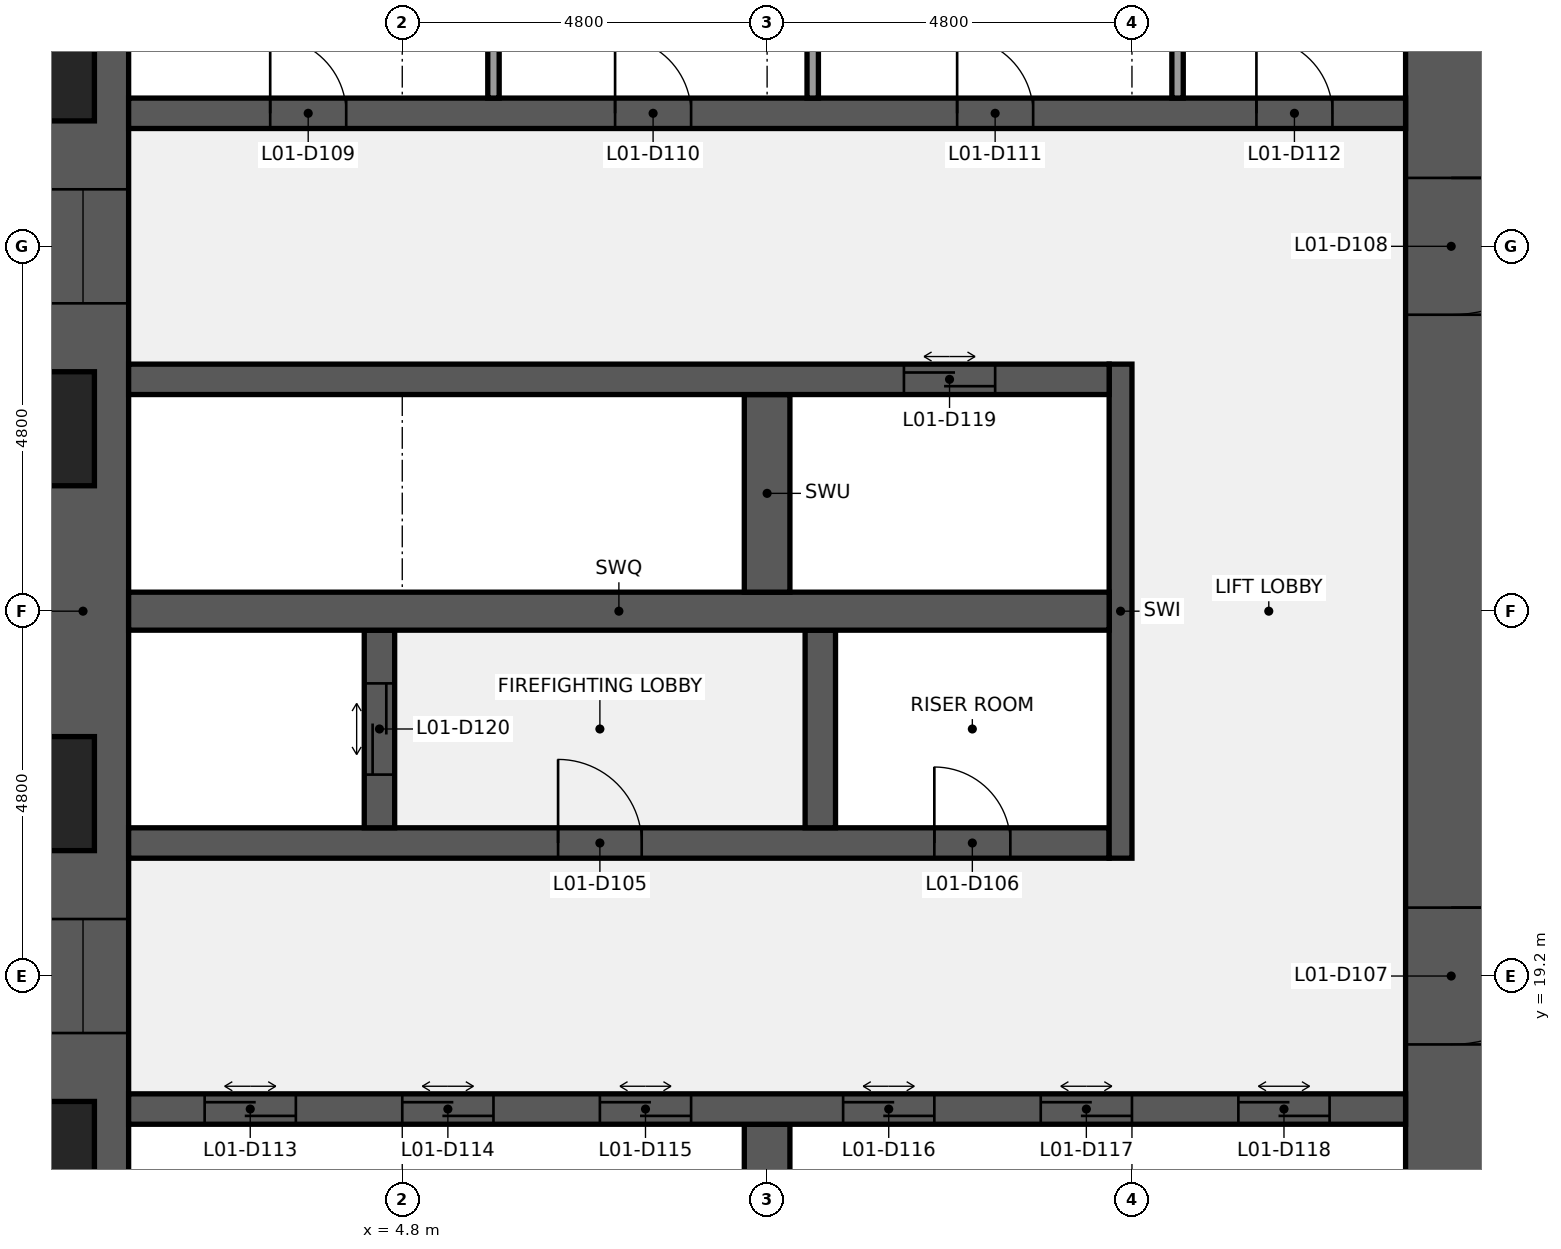
"""IFC4 building model, lengths in metres.
Left out: names, types, materials, properties, quantities, classifications, styles, units other than length and angle.
Written with IfcOpenShell. Run it as: python <this file> out.ifc"""

import sys

from ifc_helpers import new_model, si_unit, direction, frame, frame_2d, origin, place, context, subcontext, project, spatial, rectangle, extrude, element, fill, save


model = new_model("IFC4")
c1 = context("Model", 3, precision=1e-05, world=origin(), true_north=direction((0.0, 1.0)))
c2 = subcontext(c1, "Body", "Model", "MODEL_VIEW")
j1 = project(units=[si_unit("LENGTHUNIT", "METRE"), si_unit("PLANEANGLEUNIT", "RADIAN")], contexts=[c1])
p1 = place(None, origin())
s1 = spatial("IfcSite", under=j1, at=p1, CompositionType="ELEMENT")
p2 = place(p1, origin())
s2 = spatial("IfcBuilding", under=s1, at=p2, CompositionType="ELEMENT")
p3 = place(p2, frame((0.0, 0.0, 12.6)))
s3 = spatial("IfcBuildingStorey", under=s2, at=p3, CompositionType="ELEMENT", Elevation=12.6)
p4 = place(p3, frame((0.6, 9.6, 0.0), z_axis=(0.0, 0.0, 1.0), x_axis=(0.0, 1.0, 0.0)))
e1 = element("IfcWall", 1, at=p4, inside=s3, PredefinedType="SHEAR", context=c2, shape_type="SweptSolid", body=[
    extrude(rectangle(XDim=28.8, YDim=1.2, at=frame_2d((14.4, 0.0))), origin(), (0.0, 0.0, 1.0), 4.24),
])
p5 = place(p4, frame((8.85, 0.0, 0.9)))
e2 = element("IfcOpeningElement", 2, at=p5, cuts=e1, PredefinedType="OPENING", context=c2, shape_type="SweptSolid", body=[
    extrude(rectangle(XDim=1.5, YDim=1.5, at=frame_2d((0.75, 0.75))), frame((0.0, 0.61, 0.0), z_axis=(0.0, -1.0, 0.0), x_axis=(1.0, 0.0, 0.0)), (0.0, 0.0, 1.0), 1.22),
])
p6 = place(p4, frame((18.45, 0.0, 0.9)))
e3 = element("IfcOpeningElement", 3, at=p6, cuts=e1, PredefinedType="OPENING", context=c2, shape_type="SweptSolid", body=[
    extrude(rectangle(XDim=1.5, YDim=1.5, at=frame_2d((0.75, 0.75))), frame((0.0, 0.61, 0.0), z_axis=(0.0, -1.0, 0.0), x_axis=(1.0, 0.0, 0.0)), (0.0, 0.0, 1.0), 1.22),
])
p7 = place(p3, frame((18.6, 38.4, 0.0), z_axis=(0.0, 0.0, 1.0), x_axis=(0.0, -1.0, 0.0)))
e4 = element("IfcWall", 4, at=p7, inside=s3, PredefinedType="SHEAR", context=c2, shape_type="SweptSolid", body=[
    extrude(rectangle(XDim=28.8, YDim=1.2, at=frame_2d((14.4, 0.0))), origin(), (0.0, 0.0, 1.0), 4.24),
])
p8 = place(p7, frame((18.3, 0.0, 0.0)))
e5 = element("IfcOpeningElement", 5, at=p8, cuts=e4, PredefinedType="OPENING", context=c2, shape_type="SweptSolid", body=[
    extrude(rectangle(XDim=1.8, YDim=2.1, at=frame_2d((0.9, 1.05))), frame((0.0, 0.61, 0.0), z_axis=(0.0, -1.0, 0.0), x_axis=(1.0, 0.0, 0.0)), (0.0, 0.0, 1.0), 1.22),
])
p9 = place(p7, frame((8.7, 0.0, 0.0)))
e6 = element("IfcOpeningElement", 6, at=p9, cuts=e4, PredefinedType="OPENING", context=c2, shape_type="SweptSolid", body=[
    extrude(rectangle(XDim=1.8, YDim=2.1, at=frame_2d((0.9, 1.05))), frame((0.0, 0.61, 0.0), z_axis=(0.0, -1.0, 0.0), x_axis=(1.0, 0.0, 0.0)), (0.0, 0.0, 1.0), 1.22),
])
p10 = place(p3, frame((9.6, 14.65, 0.0), z_axis=(0.0, 0.0, 1.0), x_axis=(0.0, 1.0, 0.0)))
e7 = element("IfcWall", 7, at=p10, inside=s3, PredefinedType="SHEAR", context=c2, shape_type="SweptSolid", body=[
    extrude(rectangle(XDim=2.6, YDim=0.6, at=frame_2d((1.3, 0.0))), origin(), (0.0, 0.0, 1.0), 4.24),
])
p11 = place(p3, frame((1.2, 17.45, 0.0), z_axis=(0.0, 0.0, 1.0), x_axis=(1.0, 0.0, 0.0)))
e8 = element("IfcWall", 8, at=p11, inside=s3, PredefinedType="SHEAR", context=c2, shape_type="SweptSolid", body=[
    extrude(rectangle(XDim=16.8, YDim=0.4, at=frame_2d((8.4, 0.0))), origin(), (0.0, 0.0, 1.0), 4.24),
])
p12 = place(p11, frame((1.0, 0.0, 0.0)))
e9 = element("IfcOpeningElement", 9, at=p12, cuts=e8, PredefinedType="OPENING", context=c2, shape_type="SweptSolid", body=[
    extrude(rectangle(XDim=1.2, YDim=2.1, at=frame_2d((0.6, 1.05))), frame((0.0, 0.21, 0.0), z_axis=(0.0, -1.0, 0.0), x_axis=(1.0, 0.0, 0.0)), (0.0, 0.0, 1.0), 0.42),
])
p13 = place(p11, frame((3.6, 0.0, 0.0)))
e10 = element("IfcOpeningElement", 10, at=p13, cuts=e8, PredefinedType="OPENING", context=c2, shape_type="SweptSolid", body=[
    extrude(rectangle(XDim=1.2, YDim=2.1, at=frame_2d((0.6, 1.05))), frame((0.0, 0.21, 0.0), z_axis=(0.0, -1.0, 0.0), x_axis=(1.0, 0.0, 0.0)), (0.0, 0.0, 1.0), 0.42),
])
p14 = place(p11, frame((6.2, 0.0, 0.0)))
e11 = element("IfcOpeningElement", 11, at=p14, cuts=e8, PredefinedType="OPENING", context=c2, shape_type="SweptSolid", body=[
    extrude(rectangle(XDim=1.2, YDim=2.1, at=frame_2d((0.6, 1.05))), frame((0.0, 0.21, 0.0), z_axis=(0.0, -1.0, 0.0), x_axis=(1.0, 0.0, 0.0)), (0.0, 0.0, 1.0), 0.42),
])
p15 = place(p11, frame((9.4, 0.0, 0.0)))
e12 = element("IfcOpeningElement", 12, at=p15, cuts=e8, PredefinedType="OPENING", context=c2, shape_type="SweptSolid", body=[
    extrude(rectangle(XDim=1.2, YDim=2.1, at=frame_2d((0.6, 1.05))), frame((0.0, 0.21, 0.0), z_axis=(0.0, -1.0, 0.0), x_axis=(1.0, 0.0, 0.0)), (0.0, 0.0, 1.0), 0.42),
])
p16 = place(p11, frame((12.0, 0.0, 0.0)))
e13 = element("IfcOpeningElement", 13, at=p16, cuts=e8, PredefinedType="OPENING", context=c2, shape_type="SweptSolid", body=[
    extrude(rectangle(XDim=1.2, YDim=2.1, at=frame_2d((0.6, 1.05))), frame((0.0, 0.21, 0.0), z_axis=(0.0, -1.0, 0.0), x_axis=(1.0, 0.0, 0.0)), (0.0, 0.0, 1.0), 0.42),
])
p17 = place(p11, frame((14.6, 0.0, 0.0)))
e14 = element("IfcOpeningElement", 14, at=p17, cuts=e8, PredefinedType="OPENING", context=c2, shape_type="SweptSolid", body=[
    extrude(rectangle(XDim=1.2, YDim=2.1, at=frame_2d((0.6, 1.05))), frame((0.0, 0.21, 0.0), z_axis=(0.0, -1.0, 0.0), x_axis=(1.0, 0.0, 0.0)), (0.0, 0.0, 1.0), 0.42),
])
p18 = place(p3, frame((1.2, 20.95, 0.0), z_axis=(0.0, 0.0, 1.0), x_axis=(1.0, 0.0, 0.0)))
e15 = element("IfcWall", 15, at=p18, inside=s3, PredefinedType="SHEAR", context=c2, shape_type="SweptSolid", body=[
    extrude(rectangle(XDim=12.9, YDim=0.4, at=frame_2d((6.45, 0.0))), origin(), (0.0, 0.0, 1.0), 4.24),
])
p19 = place(p18, frame((5.65, 0.0, 0.0)))
e16 = element("IfcOpeningElement", 16, at=p19, cuts=e15, PredefinedType="OPENING", context=c2, shape_type="SweptSolid", body=[
    extrude(rectangle(XDim=1.1, YDim=2.1, at=frame_2d((0.55, 1.05))), frame((0.0, 0.21, 0.0), z_axis=(0.0, -1.0, 0.0), x_axis=(1.0, 0.0, 0.0)), (0.0, 0.0, 1.0), 0.42),
])
p20 = place(p18, frame((10.6, 0.0, 0.0)))
e17 = element("IfcOpeningElement", 17, at=p20, cuts=e15, PredefinedType="OPENING", context=c2, shape_type="SweptSolid", body=[
    extrude(rectangle(XDim=1.0, YDim=2.1, at=frame_2d((0.5, 1.05))), frame((0.0, 0.21, 0.0), z_axis=(0.0, -1.0, 0.0), x_axis=(1.0, 0.0, 0.0)), (0.0, 0.0, 1.0), 0.42),
])
p21 = place(p3, frame((14.25, 20.75, 0.0), z_axis=(0.0, 0.0, 1.0), x_axis=(0.0, 1.0, 0.0)))
e18 = element("IfcWall", 18, at=p21, inside=s3, PredefinedType="SHEAR", context=c2, shape_type="SweptSolid", body=[
    extrude(rectangle(XDim=6.5, YDim=0.3, at=frame_2d((3.25, 0.0))), origin(), (0.0, 0.0, 1.0), 4.24),
])
p22 = place(p3, frame((4.5, 21.15, 0.0), z_axis=(0.0, 0.0, 1.0), x_axis=(0.0, 1.0, 0.0)))
e19 = element("IfcWall", 19, at=p22, inside=s3, PredefinedType="SHEAR", context=c2, shape_type="SweptSolid", body=[
    extrude(rectangle(XDim=2.6, YDim=0.4, at=frame_2d((1.3, 0.0))), origin(), (0.0, 0.0, 1.0), 4.24),
])
p23 = place(p22, frame((0.7, 0.0, 0.0)))
e20 = element("IfcOpeningElement", 20, at=p23, cuts=e19, PredefinedType="OPENING", context=c2, shape_type="SweptSolid", body=[
    extrude(rectangle(XDim=1.2, YDim=2.1, at=frame_2d((0.6, 1.05))), frame((0.0, 0.21, 0.0), z_axis=(0.0, -1.0, 0.0), x_axis=(1.0, 0.0, 0.0)), (0.0, 0.0, 1.0), 0.42),
])
p24 = place(p3, frame((10.3, 21.15, 0.0), z_axis=(0.0, 0.0, 1.0), x_axis=(0.0, 1.0, 0.0)))
e21 = element("IfcWall", 21, at=p24, inside=s3, PredefinedType="SHEAR", context=c2, shape_type="SweptSolid", body=[
    extrude(rectangle(XDim=2.6, YDim=0.4, at=frame_2d((1.3, 0.0))), origin(), (0.0, 0.0, 1.0), 4.24),
])
p25 = place(p3, frame((1.2, 24.0, 0.0), z_axis=(0.0, 0.0, 1.0), x_axis=(1.0, 0.0, 0.0)))
e22 = element("IfcWall", 22, at=p25, inside=s3, PredefinedType="SHEAR", context=c2, shape_type="SweptSolid", body=[
    extrude(rectangle(XDim=12.9, YDim=0.5, at=frame_2d((6.45, 0.0))), origin(), (0.0, 0.0, 1.0), 4.24),
])
p26 = place(p3, frame((9.6, 24.25, 0.0), z_axis=(0.0, 0.0, 1.0), x_axis=(0.0, 1.0, 0.0)))
e23 = element("IfcWall", 23, at=p26, inside=s3, PredefinedType="SHEAR", context=c2, shape_type="SweptSolid", body=[
    extrude(rectangle(XDim=2.6, YDim=0.6, at=frame_2d((1.3, 0.0))), origin(), (0.0, 0.0, 1.0), 4.24),
])
p27 = place(p3, frame((1.2, 27.05, 0.0), z_axis=(0.0, 0.0, 1.0), x_axis=(1.0, 0.0, 0.0)))
e24 = element("IfcWall", 24, at=p27, inside=s3, PredefinedType="SHEAR", context=c2, shape_type="SweptSolid", body=[
    extrude(rectangle(XDim=12.9, YDim=0.4, at=frame_2d((6.45, 0.0))), origin(), (0.0, 0.0, 1.0), 4.24),
])
p28 = place(p27, frame((10.2, 0.0, 0.0)))
e25 = element("IfcOpeningElement", 25, at=p28, cuts=e24, PredefinedType="OPENING", context=c2, shape_type="SweptSolid", body=[
    extrude(rectangle(XDim=1.2, YDim=2.1, at=frame_2d((0.6, 1.05))), frame((0.0, 0.21, 0.0), z_axis=(0.0, -1.0, 0.0), x_axis=(1.0, 0.0, 0.0)), (0.0, 0.0, 1.0), 0.42),
])
p29 = place(p3, frame((1.2, 30.55, 0.0), z_axis=(0.0, 0.0, 1.0), x_axis=(1.0, 0.0, 0.0)))
e26 = element("IfcWall", 26, at=p29, inside=s3, PredefinedType="SHEAR", context=c2, shape_type="SweptSolid", body=[
    extrude(rectangle(XDim=16.8, YDim=0.4, at=frame_2d((8.4, 0.0))), origin(), (0.0, 0.0, 1.0), 4.24),
])
p30 = place(p29, frame((1.863, 0.0, 0.0)))
e27 = element("IfcOpeningElement", 27, at=p30, cuts=e26, PredefinedType="OPENING", context=c2, shape_type="SweptSolid", body=[
    extrude(rectangle(XDim=1.0, YDim=2.1, at=frame_2d((0.5, 1.05))), frame((0.0, 0.21, 0.0), z_axis=(0.0, -1.0, 0.0), x_axis=(1.0, 0.0, 0.0)), (0.0, 0.0, 1.0), 0.42),
])
p31 = place(p29, frame((6.4, 0.0, 0.0)))
e28 = element("IfcOpeningElement", 28, at=p31, cuts=e26, PredefinedType="OPENING", context=c2, shape_type="SweptSolid", body=[
    extrude(rectangle(XDim=1.0, YDim=2.1, at=frame_2d((0.5, 1.05))), frame((0.0, 0.21, 0.0), z_axis=(0.0, -1.0, 0.0), x_axis=(1.0, 0.0, 0.0)), (0.0, 0.0, 1.0), 0.42),
])
p32 = place(p29, frame((10.9, 0.0, 0.0)))
e29 = element("IfcOpeningElement", 29, at=p32, cuts=e26, PredefinedType="OPENING", context=c2, shape_type="SweptSolid", body=[
    extrude(rectangle(XDim=1.0, YDim=2.1, at=frame_2d((0.5, 1.05))), frame((0.0, 0.21, 0.0), z_axis=(0.0, -1.0, 0.0), x_axis=(1.0, 0.0, 0.0)), (0.0, 0.0, 1.0), 0.42),
])
p33 = place(p29, frame((14.837, 0.0, 0.0)))
e30 = element("IfcOpeningElement", 30, at=p33, cuts=e26, PredefinedType="OPENING", context=c2, shape_type="SweptSolid", body=[
    extrude(rectangle(XDim=1.0, YDim=2.1, at=frame_2d((0.5, 1.05))), frame((0.0, 0.21, 0.0), z_axis=(0.0, -1.0, 0.0), x_axis=(1.0, 0.0, 0.0)), (0.0, 0.0, 1.0), 0.42),
])
for number, where, z_axis, x_axis in (
    (31, (6.0, 30.75, 0.0), (0.0, 0.0, 1.0), (0.0, 1.0, 0.0)),
    (32, (10.2, 30.75, 0.0), (0.0, 0.0, 1.0), (0.0, 1.0, 0.0)),
    (33, (15.0, 30.75, 0.0), (0.0, 0.0, 1.0), (0.0, 1.0, 0.0)),
):
    element("IfcWall", number, at=place(p3, frame(where, z_axis=z_axis, x_axis=x_axis)), inside=s3, PredefinedType="PARTITIONING", context=c2, shape_type="SweptSolid", body=[
        extrude(rectangle(XDim=2.6, YDim=0.15, at=frame_2d((1.3, 0.0))), origin(), (0.0, 0.0, 1.0), 4.24),
    ])
p34 = place(p19, origin())
e34 = element("IfcDoor", 34, at=p34, inside=s3, OperationType="SINGLE_SWING_LEFT", PredefinedType="DOOR", context=c2, shape_type="SweptSolid", body=[
    extrude(rectangle(XDim=1.1, YDim=2.1, at=frame_2d((0.55, 1.05))), frame((0.0, 0.025, 0.0), z_axis=(0.0, -1.0, 0.0), x_axis=(1.0, 0.0, 0.0)), (0.0, 0.0, 1.0), 0.05),
])
fill(e16, e34)
p35 = place(p20, origin())
e35 = element("IfcDoor", 35, at=p35, inside=s3, OperationType="SINGLE_SWING_LEFT", PredefinedType="DOOR", context=c2, shape_type="SweptSolid", body=[
    extrude(rectangle(XDim=1.0, YDim=2.1, at=frame_2d((0.5, 1.05))), frame((0.0, 0.025, 0.0), z_axis=(0.0, -1.0, 0.0), x_axis=(1.0, 0.0, 0.0)), (0.0, 0.0, 1.0), 0.05),
])
fill(e17, e35)
p36 = place(p8, origin())
e36 = element("IfcDoor", 36, at=p36, inside=s3, OperationType="DOUBLE_DOOR_SINGLE_SWING", PredefinedType="DOOR", context=c2, shape_type="SweptSolid", body=[
    extrude(rectangle(XDim=1.8, YDim=2.1, at=frame_2d((0.9, 1.05))), frame((0.0, 0.025, 0.0), z_axis=(0.0, -1.0, 0.0), x_axis=(1.0, 0.0, 0.0)), (0.0, 0.0, 1.0), 0.05),
])
fill(e5, e36)
p37 = place(p9, origin())
e37 = element("IfcDoor", 37, at=p37, inside=s3, OperationType="DOUBLE_DOOR_SINGLE_SWING", PredefinedType="DOOR", context=c2, shape_type="SweptSolid", body=[
    extrude(rectangle(XDim=1.8, YDim=2.1, at=frame_2d((0.9, 1.05))), frame((0.0, 0.025, 0.0), z_axis=(0.0, -1.0, 0.0), x_axis=(1.0, 0.0, 0.0)), (0.0, 0.0, 1.0), 0.05),
])
fill(e6, e37)
p38 = place(p30, origin())
e38 = element("IfcDoor", 38, at=p38, inside=s3, OperationType="SINGLE_SWING_LEFT", PredefinedType="DOOR", context=c2, shape_type="SweptSolid", body=[
    extrude(rectangle(XDim=1.0, YDim=2.1, at=frame_2d((0.5, 1.05))), frame((0.0, 0.025, 0.0), z_axis=(0.0, -1.0, 0.0), x_axis=(1.0, 0.0, 0.0)), (0.0, 0.0, 1.0), 0.05),
])
fill(e27, e38)
p39 = place(p31, origin())
e39 = element("IfcDoor", 39, at=p39, inside=s3, OperationType="SINGLE_SWING_LEFT", PredefinedType="DOOR", context=c2, shape_type="SweptSolid", body=[
    extrude(rectangle(XDim=1.0, YDim=2.1, at=frame_2d((0.5, 1.05))), frame((0.0, 0.025, 0.0), z_axis=(0.0, -1.0, 0.0), x_axis=(1.0, 0.0, 0.0)), (0.0, 0.0, 1.0), 0.05),
])
fill(e28, e39)
p40 = place(p32, origin())
e40 = element("IfcDoor", 40, at=p40, inside=s3, OperationType="SINGLE_SWING_LEFT", PredefinedType="DOOR", context=c2, shape_type="SweptSolid", body=[
    extrude(rectangle(XDim=1.0, YDim=2.1, at=frame_2d((0.5, 1.05))), frame((0.0, 0.025, 0.0), z_axis=(0.0, -1.0, 0.0), x_axis=(1.0, 0.0, 0.0)), (0.0, 0.0, 1.0), 0.05),
])
fill(e29, e40)
p41 = place(p33, origin())
e41 = element("IfcDoor", 41, at=p41, inside=s3, OperationType="SINGLE_SWING_LEFT", PredefinedType="DOOR", context=c2, shape_type="SweptSolid", body=[
    extrude(rectangle(XDim=1.0, YDim=2.1, at=frame_2d((0.5, 1.05))), frame((0.0, 0.025, 0.0), z_axis=(0.0, -1.0, 0.0), x_axis=(1.0, 0.0, 0.0)), (0.0, 0.0, 1.0), 0.05),
])
fill(e30, e41)
p42 = place(p12, origin())
e42 = element("IfcDoor", 42, at=p42, inside=s3, OperationType="DOUBLE_DOOR_SLIDING", PredefinedType="DOOR", context=c2, shape_type="SweptSolid", body=[
    extrude(rectangle(XDim=1.2, YDim=2.1, at=frame_2d((0.6, 1.05))), frame((0.0, 0.025, 0.0), z_axis=(0.0, -1.0, 0.0), x_axis=(1.0, 0.0, 0.0)), (0.0, 0.0, 1.0), 0.05),
])
fill(e9, e42)
p43 = place(p13, origin())
e43 = element("IfcDoor", 43, at=p43, inside=s3, OperationType="DOUBLE_DOOR_SLIDING", PredefinedType="DOOR", context=c2, shape_type="SweptSolid", body=[
    extrude(rectangle(XDim=1.2, YDim=2.1, at=frame_2d((0.6, 1.05))), frame((0.0, 0.025, 0.0), z_axis=(0.0, -1.0, 0.0), x_axis=(1.0, 0.0, 0.0)), (0.0, 0.0, 1.0), 0.05),
])
fill(e10, e43)
p44 = place(p14, origin())
e44 = element("IfcDoor", 44, at=p44, inside=s3, OperationType="DOUBLE_DOOR_SLIDING", PredefinedType="DOOR", context=c2, shape_type="SweptSolid", body=[
    extrude(rectangle(XDim=1.2, YDim=2.1, at=frame_2d((0.6, 1.05))), frame((0.0, 0.025, 0.0), z_axis=(0.0, -1.0, 0.0), x_axis=(1.0, 0.0, 0.0)), (0.0, 0.0, 1.0), 0.05),
])
fill(e11, e44)
p45 = place(p15, origin())
e45 = element("IfcDoor", 45, at=p45, inside=s3, OperationType="DOUBLE_DOOR_SLIDING", PredefinedType="DOOR", context=c2, shape_type="SweptSolid", body=[
    extrude(rectangle(XDim=1.2, YDim=2.1, at=frame_2d((0.6, 1.05))), frame((0.0, 0.025, 0.0), z_axis=(0.0, -1.0, 0.0), x_axis=(1.0, 0.0, 0.0)), (0.0, 0.0, 1.0), 0.05),
])
fill(e12, e45)
p46 = place(p16, origin())
e46 = element("IfcDoor", 46, at=p46, inside=s3, OperationType="DOUBLE_DOOR_SLIDING", PredefinedType="DOOR", context=c2, shape_type="SweptSolid", body=[
    extrude(rectangle(XDim=1.2, YDim=2.1, at=frame_2d((0.6, 1.05))), frame((0.0, 0.025, 0.0), z_axis=(0.0, -1.0, 0.0), x_axis=(1.0, 0.0, 0.0)), (0.0, 0.0, 1.0), 0.05),
])
fill(e13, e46)
p47 = place(p17, origin())
e47 = element("IfcDoor", 47, at=p47, inside=s3, OperationType="DOUBLE_DOOR_SLIDING", PredefinedType="DOOR", context=c2, shape_type="SweptSolid", body=[
    extrude(rectangle(XDim=1.2, YDim=2.1, at=frame_2d((0.6, 1.05))), frame((0.0, 0.025, 0.0), z_axis=(0.0, -1.0, 0.0), x_axis=(1.0, 0.0, 0.0)), (0.0, 0.0, 1.0), 0.05),
])
fill(e14, e47)
p48 = place(p28, origin())
e48 = element("IfcDoor", 48, at=p48, inside=s3, OperationType="DOUBLE_DOOR_SLIDING", PredefinedType="DOOR", context=c2, shape_type="SweptSolid", body=[
    extrude(rectangle(XDim=1.2, YDim=2.1, at=frame_2d((0.6, 1.05))), frame((0.0, 0.025, 0.0), z_axis=(0.0, -1.0, 0.0), x_axis=(1.0, 0.0, 0.0)), (0.0, 0.0, 1.0), 0.05),
])
fill(e25, e48)
p49 = place(p23, origin())
e49 = element("IfcDoor", 49, at=p49, inside=s3, OperationType="DOUBLE_DOOR_SLIDING", PredefinedType="DOOR", context=c2, shape_type="SweptSolid", body=[
    extrude(rectangle(XDim=1.2, YDim=2.1, at=frame_2d((0.6, 1.05))), frame((0.0, 0.025, 0.0), z_axis=(0.0, -1.0, 0.0), x_axis=(1.0, 0.0, 0.0)), (0.0, 0.0, 1.0), 0.05),
])
fill(e20, e49)
p50 = place(p5, origin())
e50 = element("IfcWindow", 50, at=p50, inside=s3, PartitioningType="SINGLE_PANEL", PredefinedType="WINDOW", context=c2, shape_type="SweptSolid", body=[
    extrude(rectangle(XDim=1.5, YDim=1.5, at=frame_2d((0.75, 0.75))), frame((0.0, 0.03, 0.0), z_axis=(0.0, -1.0, 0.0), x_axis=(1.0, 0.0, 0.0)), (0.0, 0.0, 1.0), 0.06),
])
fill(e2, e50)
p51 = place(p6, origin())
e51 = element("IfcWindow", 51, at=p51, inside=s3, PartitioningType="SINGLE_PANEL", PredefinedType="WINDOW", context=c2, shape_type="SweptSolid", body=[
    extrude(rectangle(XDim=1.5, YDim=1.5, at=frame_2d((0.75, 0.75))), frame((0.0, 0.03, 0.0), z_axis=(0.0, -1.0, 0.0), x_axis=(1.0, 0.0, 0.0)), (0.0, 0.0, 1.0), 0.06),
])
fill(e3, e51)
save(model, sys.argv[1])
